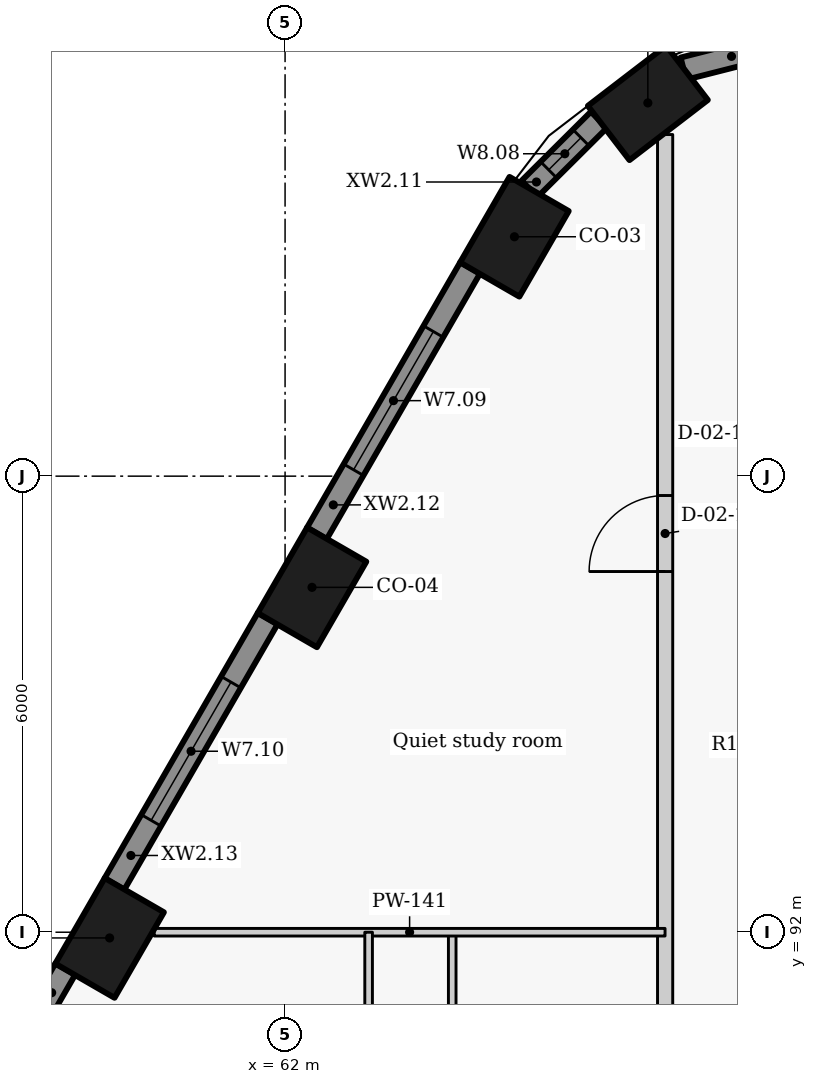
"""IFC4 building model, lengths in metres.
Left out: names, types, materials, properties, quantities, classifications, styles, units other than length and angle.
Written with IfcOpenShell. Run it as: python <this file> out.ifc"""

import sys

from ifc_helpers import new_model, si_unit, direction, frame, frame_2d, origin, origin_2d, place, context, subcontext, project, spatial, rectangle, extrude, element, fill, save


model = new_model("IFC4")
c1 = context("Model", 3, precision=1e-05, world=origin(), true_north=direction((0.0, 1.0)))
c2 = subcontext(c1, "Body", "Model", "MODEL_VIEW")
j1 = project(units=[si_unit("LENGTHUNIT", "METRE"), si_unit("PLANEANGLEUNIT", "RADIAN")], contexts=[c1])
p1 = place(None, origin())
s1 = spatial("IfcSite", under=j1, at=p1, CompositionType="ELEMENT")
p2 = place(p1, origin())
s2 = spatial("IfcBuilding", under=s1, at=p2, CompositionType="ELEMENT")
p3 = place(p2, frame((0.0, 0.0, 160.2)))
s3 = spatial("IfcBuildingStorey", under=s2, at=p3, CompositionType="ELEMENT", Elevation=160.2)
for number, where, z_axis, x_axis in (
    (1, (66.773, 102.91, 0.0), (0.0, 0.0, 1.0), (-0.793, -0.609, 0.0)),
    (2, (65.018, 101.149, 0.0), (0.0, 0.0, 1.0), (-0.5, -0.866, 0.0)),
    (3, (62.354, 96.537, 0.0), (0.0, 0.0, 1.0), (-0.5, -0.866, 0.0)),
    (4, (59.692, 91.925, 0.0), (0.0, 0.0, 1.0), (-0.5, -0.866, 0.0)),
):
    element("IfcColumn", number, at=place(p3, frame(where, z_axis=z_axis, x_axis=x_axis)), inside=s3, PredefinedType="COLUMN", context=c2, shape_type="SweptSolid", body=[
        extrude(rectangle(XDim=1.3, YDim=0.9, at=origin_2d()), origin(), (0.0, 0.0, 1.0), 3.3),
    ])
p4 = place(p3, frame((68.506, 103.683, 0.0), z_axis=(0.0, 0.0, 1.0), x_axis=(-0.96924493129, -0.246098076322, 0.0)))
e5 = element("IfcWall", 5, at=p4, inside=s3, PredefinedType="SOLIDWALL", context=c2, shape_type="SweptSolid", body=[
    extrude(rectangle(XDim=1.305, YDim=0.3, at=frame_2d((0.653, 0.0))), origin(), (0.0, 0.0, 1.0), 2.425),
])
p5 = place(p3, frame((66.129, 102.688, 0.0), z_axis=(0.0, 0.0, 1.0), x_axis=(-0.70881270082, -0.705396735997, 0.0)))
e6 = element("IfcWall", 6, at=p5, inside=s3, PredefinedType="SOLIDWALL", context=c2, shape_type="SweptSolid", body=[
    extrude(rectangle(XDim=1.286, YDim=0.3, at=frame_2d((0.643, 0.0))), origin(), (0.0, 0.0, 1.0), 2.425),
])
p6 = place(p5, frame((0.333, 0.0, 0.9)))
e7 = element("IfcOpeningElement", 7, at=p6, cuts=e6, PredefinedType="OPENING", context=c2, shape_type="SweptSolid", body=[
    extrude(rectangle(XDim=0.6, YDim=1.1, at=frame_2d((0.3, 0.55))), frame((0.0, 0.16, 0.0), z_axis=(0.0, -1.0, 0.0), x_axis=(1.0, 0.0, 0.0)), (0.0, 0.0, 1.0), 0.32),
])
p7 = place(p3, frame((64.435, 100.74, 0.0), z_axis=(0.0, 0.0, 1.0), x_axis=(-0.500031546601, -0.86600718958, 0.0)))
e8 = element("IfcWall", 8, at=p7, inside=s3, PredefinedType="SOLIDWALL", context=c2, shape_type="SweptSolid", body=[
    extrude(rectangle(XDim=4.034, YDim=0.3, at=frame_2d((2.017, 0.0))), origin(), (0.0, 0.0, 1.0), 2.425),
])
p8 = place(p7, frame((0.967, 0.0, 0.9)))
e9 = element("IfcOpeningElement", 9, at=p8, cuts=e8, PredefinedType="OPENING", context=c2, shape_type="SweptSolid", body=[
    extrude(rectangle(XDim=2.1, YDim=1.1, at=frame_2d((1.05, 0.55))), frame((0.0, 0.16, 0.0), z_axis=(0.0, -1.0, 0.0), x_axis=(1.0, 0.0, 0.0)), (0.0, 0.0, 1.0), 0.32),
])
p9 = place(p3, frame((61.772, 96.128, 0.0), z_axis=(0.0, 0.0, 1.0), x_axis=(-0.500031546601, -0.86600718958, 0.0)))
e10 = element("IfcWall", 10, at=p9, inside=s3, PredefinedType="SOLIDWALL", context=c2, shape_type="SweptSolid", body=[
    extrude(rectangle(XDim=4.034, YDim=0.3, at=frame_2d((2.017, 0.0))), origin(), (0.0, 0.0, 1.0), 2.425),
])
p10 = place(p9, frame((0.967, 0.0, 0.9)))
e11 = element("IfcOpeningElement", 11, at=p10, cuts=e10, PredefinedType="OPENING", context=c2, shape_type="SweptSolid", body=[
    extrude(rectangle(XDim=2.1, YDim=1.1, at=frame_2d((1.05, 0.55))), frame((0.0, 0.16, 0.0), z_axis=(0.0, -1.0, 0.0), x_axis=(1.0, 0.0, 0.0)), (0.0, 0.0, 1.0), 0.32),
])
p11 = place(p3, frame((59.109, 91.515, 0.0), z_axis=(0.0, 0.0, 1.0), x_axis=(-0.499933594891, -0.866063739398, 0.0)))
e12 = element("IfcWall", 12, at=p11, inside=s3, PredefinedType="SOLIDWALL", context=c2, shape_type="SweptSolid", body=[
    extrude(rectangle(XDim=3.737, YDim=0.3, at=frame_2d((1.868, 0.0))), origin(), (0.0, 0.0, 1.0), 2.425),
])
p12 = place(p11, frame((0.818, 0.0, 0.9)))
e13 = element("IfcOpeningElement", 13, at=p12, cuts=e12, PredefinedType="OPENING", context=c2, shape_type="SweptSolid", body=[
    extrude(rectangle(XDim=2.1, YDim=1.1, at=frame_2d((1.05, 0.55))), frame((0.0, 0.16, 0.0), z_axis=(0.0, -1.0, 0.0), x_axis=(1.0, 0.0, 0.0)), (0.0, 0.0, 1.0), 0.32),
])
p13 = place(p3, frame((67.0, 56.833, 0.0), z_axis=(0.0, 0.0, 1.0), x_axis=(0.0, 1.0, 0.0)))
e14 = element("IfcWall", 14, at=p13, inside=s3, PredefinedType="PARTITIONING", context=c2, shape_type="SweptSolid", body=[
    extrude(rectangle(XDim=45.661, YDim=0.2, at=frame_2d((22.831, 0.0))), origin(), (0.0, 0.0, 1.0), 2.405),
])
p14 = place(p13, frame((7.084, 0.0, 0.0)))
e15 = element("IfcOpeningElement", 15, at=p14, cuts=e14, PredefinedType="OPENING", context=c2, shape_type="SweptSolid", body=[
    extrude(rectangle(XDim=1.0, YDim=2.1, at=frame_2d((0.5, 1.05))), frame((0.0, 0.11, 0.0), z_axis=(0.0, -1.0, 0.0), x_axis=(1.0, 0.0, 0.0)), (0.0, 0.0, 1.0), 0.22),
])
p15 = place(p13, frame((15.442, 0.0, 0.0)))
e16 = element("IfcOpeningElement", 16, at=p15, cuts=e14, PredefinedType="OPENING", context=c2, shape_type="SweptSolid", body=[
    extrude(rectangle(XDim=1.0, YDim=2.1, at=frame_2d((0.5, 1.05))), frame((0.0, 0.11, 0.0), z_axis=(0.0, -1.0, 0.0), x_axis=(1.0, 0.0, 0.0)), (0.0, 0.0, 1.0), 0.22),
])
p16 = place(p13, frame((26.567, 0.0, 0.0)))
e17 = element("IfcOpeningElement", 17, at=p16, cuts=e14, PredefinedType="OPENING", context=c2, shape_type="SweptSolid", body=[
    extrude(rectangle(XDim=1.0, YDim=2.1, at=frame_2d((0.5, 1.05))), frame((0.0, 0.11, 0.0), z_axis=(0.0, -1.0, 0.0), x_axis=(1.0, 0.0, 0.0)), (0.0, 0.0, 1.0), 0.22),
])
p17 = place(p13, frame((39.912, 0.0, 0.0)))
e18 = element("IfcOpeningElement", 18, at=p17, cuts=e14, PredefinedType="OPENING", context=c2, shape_type="SweptSolid", body=[
    extrude(rectangle(XDim=1.0, YDim=2.1, at=frame_2d((0.5, 1.05))), frame((0.0, 0.11, 0.0), z_axis=(0.0, -1.0, 0.0), x_axis=(1.0, 0.0, 0.0)), (0.0, 0.0, 1.0), 0.22),
])
p18 = place(p3, frame((64.199, 92.0, 0.0), z_axis=(0.0, 0.0, 1.0), x_axis=(0.0, -1.0, 0.0)))
e19 = element("IfcWall", 19, at=p18, inside=s3, PredefinedType="PARTITIONING", context=c2, shape_type="SweptSolid", body=[
    extrude(rectangle(XDim=7.3, YDim=0.1, at=frame_2d((3.65, 0.0))), origin(), (0.0, 0.0, 1.0), 3.025),
])
p19 = place(p18, frame((5.216, 0.0, 0.0)))
e20 = element("IfcOpeningElement", 20, at=p19, cuts=e19, PredefinedType="OPENING", context=c2, shape_type="SweptSolid", body=[
    extrude(rectangle(XDim=0.85, YDim=2.1, at=frame_2d((0.425, 1.05))), frame((0.0, 0.06, 0.0), z_axis=(0.0, -1.0, 0.0), x_axis=(1.0, 0.0, 0.0)), (0.0, 0.0, 1.0), 0.12),
])
p20 = place(p18, frame((1.541, 0.0, 0.0)))
e21 = element("IfcOpeningElement", 21, at=p20, cuts=e19, PredefinedType="OPENING", context=c2, shape_type="SweptSolid", body=[
    extrude(rectangle(XDim=0.9, YDim=2.1, at=frame_2d((0.45, 1.05))), frame((0.0, 0.06, 0.0), z_axis=(0.0, -1.0, 0.0), x_axis=(1.0, 0.0, 0.0)), (0.0, 0.0, 1.0), 0.12),
])
p21 = place(p3, frame((60.278, 92.0, 0.0), z_axis=(0.0, 0.0, 1.0), x_axis=(1.0, 0.0, 0.0)))
e22 = element("IfcWall", 22, at=p21, inside=s3, PredefinedType="PARTITIONING", context=c2, shape_type="SweptSolid", body=[
    extrude(rectangle(XDim=6.721, YDim=0.1, at=frame_2d((3.361, 0.0))), origin(), (0.0, 0.0, 1.0), 3.025),
])
p22 = place(p3, frame((63.099, 83.1, 0.0), z_axis=(0.0, 0.0, 1.0), x_axis=(0.0, 1.0, 0.0)))
e23 = element("IfcWall", 23, at=p22, inside=s3, PredefinedType="PARTITIONING", context=c2, shape_type="SweptSolid", body=[
    extrude(rectangle(XDim=8.9, YDim=0.1, at=frame_2d((4.45, 0.0))), origin(), (0.0, 0.0, 1.0), 3.025),
])
p23 = place(p22, frame((4.0, 0.0, 0.0)))
e24 = element("IfcOpeningElement", 24, at=p23, cuts=e23, PredefinedType="OPENING", context=c2, shape_type="SweptSolid", body=[
    extrude(rectangle(XDim=0.9, YDim=2.1, at=frame_2d((0.45, 1.05))), frame((0.0, 0.06, 0.0), z_axis=(0.0, -1.0, 0.0), x_axis=(1.0, 0.0, 0.0)), (0.0, 0.0, 1.0), 0.12),
])
p24 = place(p6, origin())
e25 = element("IfcWindow", 25, at=p24, inside=s3, PartitioningType="SINGLE_PANEL", PredefinedType="WINDOW", context=c2, shape_type="SweptSolid", body=[
    extrude(rectangle(XDim=0.6, YDim=1.1, at=frame_2d((0.3, 0.55))), frame((0.0, 0.03, 0.0), z_axis=(0.0, -1.0, 0.0), x_axis=(1.0, 0.0, 0.0)), (0.0, 0.0, 1.0), 0.06),
])
fill(e7, e25)
p25 = place(p8, origin())
e26 = element("IfcWindow", 26, at=p25, inside=s3, PartitioningType="SINGLE_PANEL", PredefinedType="WINDOW", context=c2, shape_type="SweptSolid", body=[
    extrude(rectangle(XDim=2.1, YDim=1.1, at=frame_2d((1.05, 0.55))), frame((0.0, 0.03, 0.0), z_axis=(0.0, -1.0, 0.0), x_axis=(1.0, 0.0, 0.0)), (0.0, 0.0, 1.0), 0.06),
])
fill(e9, e26)
p26 = place(p10, origin())
e27 = element("IfcWindow", 27, at=p26, inside=s3, PartitioningType="SINGLE_PANEL", PredefinedType="WINDOW", context=c2, shape_type="SweptSolid", body=[
    extrude(rectangle(XDim=2.1, YDim=1.1, at=frame_2d((1.05, 0.55))), frame((0.0, 0.03, 0.0), z_axis=(0.0, -1.0, 0.0), x_axis=(1.0, 0.0, 0.0)), (0.0, 0.0, 1.0), 0.06),
])
fill(e11, e27)
p27 = place(p17, origin())
e28 = element("IfcDoor", 28, at=p27, inside=s3, OperationType="SINGLE_SWING_LEFT", PredefinedType="DOOR", context=c2, shape_type="SweptSolid", body=[
    extrude(rectangle(XDim=1.0, YDim=2.1, at=frame_2d((0.5, 1.05))), frame((0.0, 0.025, 0.0), z_axis=(0.0, -1.0, 0.0), x_axis=(1.0, 0.0, 0.0)), (0.0, 0.0, 1.0), 0.05),
])
fill(e18, e28)
save(model, sys.argv[1])
